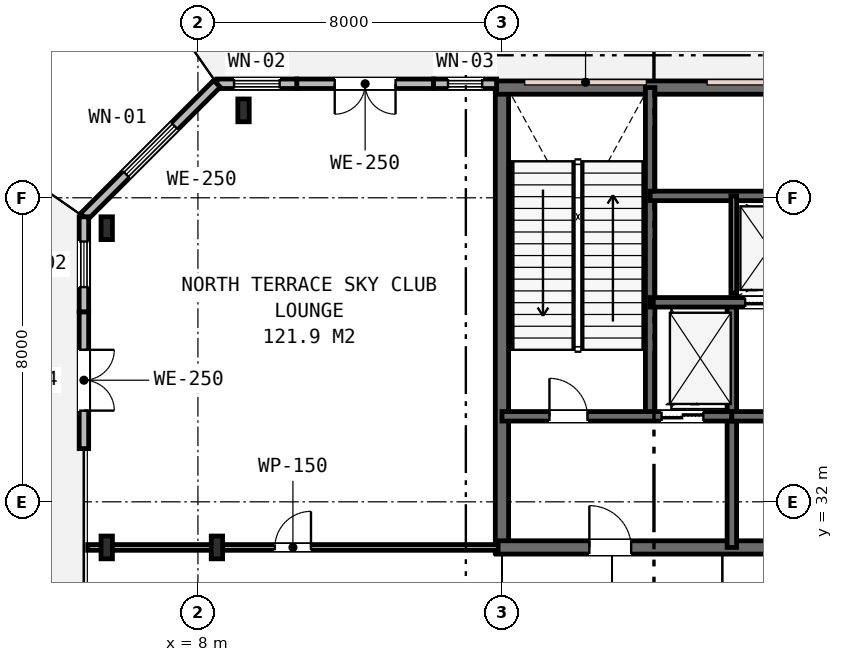
"""IFC4 building model, lengths in metres.
Left out: names, types, materials, properties, quantities, classifications, styles, units other than length and angle.
Written with IfcOpenShell. Run it as: python <this file> out.ifc"""

import sys

from ifc_helpers import new_model, si_unit, direction, frame, frame_2d, origin, origin_2d, place, context, subcontext, project, spatial, rectangle, i_section, extrude, element, fill, save


model = new_model("IFC4")
c1 = context("Model", 3, precision=1e-05, world=origin(), true_north=direction((0.0, 1.0)))
c2 = subcontext(c1, "Body", "Model", "MODEL_VIEW")
j1 = project(units=[si_unit("LENGTHUNIT", "METRE"), si_unit("PLANEANGLEUNIT", "RADIAN")], contexts=[c1])
p1 = place(None, origin())
s1 = spatial("IfcSite", under=j1, at=p1, CompositionType="ELEMENT")
p2 = place(p1, origin())
s2 = spatial("IfcBuilding", under=s1, at=p2, CompositionType="ELEMENT")
p3 = place(p2, frame((0.0, 0.0, 148.8)))
s3 = spatial("IfcBuildingStorey", under=s2, at=p3, CompositionType="ELEMENT", Elevation=148.8)
p4 = place(p3, frame((16.0, 30.65, 0.0), z_axis=(0.0, 0.0, 1.0), x_axis=(0.0, 1.0, 0.0)))
e1 = element("IfcWall", 1, at=p4, inside=s3, PredefinedType="SHEAR", context=c2, shape_type="SweptSolid", body=[
    extrude(rectangle(XDim=12.3, YDim=0.35, at=frame_2d((6.15, 0.0))), origin(), (0.0, 0.0, 1.0), 5.4),
])
p5 = place(p3, frame((15.85, 42.9, 0.0), z_axis=(0.0, 0.0, 1.0), x_axis=(1.0, 0.0, 0.0)))
e2 = element("IfcWall", 2, at=p5, inside=s3, PredefinedType="SHEAR", context=c2, shape_type="SweptSolid", body=[
    extrude(rectangle(XDim=24.3, YDim=0.35, at=frame_2d((12.15, 0.0))), origin(), (0.0, 0.0, 1.0), 5.4),
])
p6 = place(p3, frame((15.85, 30.8, 0.0), z_axis=(0.0, 0.0, 1.0), x_axis=(1.0, 0.0, 0.0)))
e3 = element("IfcWall", 3, at=p6, inside=s3, PredefinedType="SHEAR", context=c2, shape_type="SweptSolid", body=[
    extrude(rectangle(XDim=11.2, YDim=0.35, at=frame_2d((5.6, 0.0))), origin(), (0.0, 0.0, 1.0), 5.4),
])
p7 = place(p6, frame((2.45, 0.0, 0.0)))
e4 = element("IfcOpeningElement", 4, at=p7, cuts=e3, PredefinedType="OPENING", context=c2, shape_type="SweptSolid", body=[
    extrude(rectangle(XDim=1.1, YDim=2.15, at=frame_2d((0.55, 1.075))), frame((0.0, 0.185, 0.0), z_axis=(0.0, -1.0, 0.0), x_axis=(1.0, 0.0, 0.0)), (0.0, 0.0, 1.0), 0.37),
])
p8 = place(p3, frame((19.9, 34.25, 0.0), z_axis=(0.0, 0.0, 1.0), x_axis=(0.0, 1.0, 0.0)))
e5 = element("IfcWall", 5, at=p8, inside=s3, PredefinedType="SHEAR", context=c2, shape_type="SweptSolid", body=[
    extrude(rectangle(XDim=8.65, YDim=0.25, at=frame_2d((4.325, 0.0))), origin(), (0.0, 0.0, 1.0), 5.4),
])
p9 = place(p3, frame((22.05, 30.8, 0.0), z_axis=(0.0, 0.0, 1.0), x_axis=(0.0, 1.0, 0.0)))
e6 = element("IfcWall", 6, at=p9, inside=s3, PredefinedType="SHEAR", context=c2, shape_type="SweptSolid", body=[
    extrude(rectangle(XDim=6.45, YDim=0.25, at=frame_2d((3.225, 0.0))), origin(), (0.0, 0.0, 1.0), 5.4),
])
p10 = place(p3, frame((16.0, 34.25, 0.0), z_axis=(0.0, 0.0, 1.0), x_axis=(1.0, 0.0, 0.0)))
e7 = element("IfcWall", 7, at=p10, inside=s3, PredefinedType="SHEAR", context=c2, shape_type="SweptSolid", body=[
    extrude(rectangle(XDim=6.05, YDim=0.25, at=frame_2d((3.025, 0.0))), origin(), (0.0, 0.0, 1.0), 5.4),
])
p11 = place(p10, frame((1.25, 0.0, 0.0)))
e8 = element("IfcOpeningElement", 8, at=p11, cuts=e7, PredefinedType="OPENING", context=c2, shape_type="SweptSolid", body=[
    extrude(rectangle(XDim=1.0, YDim=2.15, at=frame_2d((0.5, 1.075))), frame((0.0, 0.135, 0.0), z_axis=(0.0, -1.0, 0.0), x_axis=(1.0, 0.0, 0.0)), (0.0, 0.0, 1.0), 0.27),
])
p12 = place(p10, frame((4.2, 0.0, 0.0)))
e9 = element("IfcOpeningElement", 9, at=p12, cuts=e7, PredefinedType="OPENING", context=c2, shape_type="SweptSolid", body=[
    extrude(rectangle(XDim=1.1, YDim=2.15, at=frame_2d((0.55, 1.075))), frame((0.0, 0.135, 0.0), z_axis=(0.0, -1.0, 0.0), x_axis=(1.0, 0.0, 0.0)), (0.0, 0.0, 1.0), 0.27),
])
p13 = place(p3, frame((22.05, 34.25, 0.0), z_axis=(0.0, 0.0, 1.0), x_axis=(1.0, 0.0, 0.0)))
e10 = element("IfcWall", 10, at=p13, inside=s3, PredefinedType="SHEAR", context=c2, shape_type="SweptSolid", body=[
    extrude(rectangle(XDim=5.0, YDim=0.25, at=frame_2d((2.5, 0.0))), origin(), (0.0, 0.0, 1.0), 5.4),
])
p14 = place(p13, frame((1.95, 0.0, 0.0)))
e11 = element("IfcOpeningElement", 11, at=p14, cuts=e10, PredefinedType="OPENING", context=c2, shape_type="SweptSolid", body=[
    extrude(rectangle(XDim=1.0, YDim=2.15, at=frame_2d((0.5, 1.075))), frame((0.0, 0.135, 0.0), z_axis=(0.0, -1.0, 0.0), x_axis=(1.0, 0.0, 0.0)), (0.0, 0.0, 1.0), 0.27),
])
p15 = place(p3, frame((19.9, 37.25, 0.0), z_axis=(0.0, 0.0, 1.0), x_axis=(1.0, 0.0, 0.0)))
e12 = element("IfcWall", 12, at=p15, inside=s3, PredefinedType="SHEAR", context=c2, shape_type="SweptSolid", body=[
    extrude(rectangle(XDim=16.2, YDim=0.25, at=frame_2d((8.1, 0.0))), origin(), (0.0, 0.0, 1.0), 5.4),
])
p16 = place(p15, frame((12.55, 0.0, 0.0)))
e13 = element("IfcOpeningElement", 13, at=p16, cuts=e12, PredefinedType="OPENING", context=c2, shape_type="SweptSolid", body=[
    extrude(rectangle(XDim=0.9, YDim=2.15, at=frame_2d((0.45, 1.075))), frame((0.0, 0.135, 0.0), z_axis=(0.0, -1.0, 0.0), x_axis=(1.0, 0.0, 0.0)), (0.0, 0.0, 1.0), 0.27),
])
p17 = place(p15, frame((2.5, 0.0, 0.0)))
e14 = element("IfcOpeningElement", 14, at=p17, cuts=e12, PredefinedType="OPENING", context=c2, shape_type="SweptSolid", body=[
    extrude(rectangle(XDim=1.05, YDim=2.15, at=frame_2d((0.525, 1.075))), frame((0.0, 0.135, 0.0), z_axis=(0.0, -1.0, 0.0), x_axis=(1.0, 0.0, 0.0)), (0.0, 0.0, 1.0), 0.27),
])
p18 = place(p15, frame((4.4, 0.0, 0.0)))
e15 = element("IfcOpeningElement", 15, at=p18, cuts=e12, PredefinedType="OPENING", context=c2, shape_type="SweptSolid", body=[
    extrude(rectangle(XDim=1.05, YDim=2.15, at=frame_2d((0.525, 1.075))), frame((0.0, 0.135, 0.0), z_axis=(0.0, -1.0, 0.0), x_axis=(1.0, 0.0, 0.0)), (0.0, 0.0, 1.0), 0.27),
])
p19 = place(p15, frame((6.3, 0.0, 0.0)))
e16 = element("IfcOpeningElement", 16, at=p19, cuts=e12, PredefinedType="OPENING", context=c2, shape_type="SweptSolid", body=[
    extrude(rectangle(XDim=1.05, YDim=2.15, at=frame_2d((0.525, 1.075))), frame((0.0, 0.135, 0.0), z_axis=(0.0, -1.0, 0.0), x_axis=(1.0, 0.0, 0.0)), (0.0, 0.0, 1.0), 0.27),
])
p20 = place(p3, frame((19.9, 40.05, 0.0), z_axis=(0.0, 0.0, 1.0), x_axis=(1.0, 0.0, 0.0)))
e17 = element("IfcWall", 17, at=p20, inside=s3, PredefinedType="SHEAR", context=c2, shape_type="SweptSolid", body=[
    extrude(rectangle(XDim=12.05, YDim=0.25, at=frame_2d((6.025, 0.0))), origin(), (0.0, 0.0, 1.0), 5.4),
])
for number, where, z_axis, x_axis in (
    (18, (5.6, 30.8, 0.0), (0.0, 0.0, 1.0), (1.0, 0.0, 0.0)),
    (19, (5.6, 39.2, 0.0), (0.0, 0.0, 1.0), (1.0, 0.0, 0.0)),
    (20, (8.5, 30.8, 0.0), (0.0, 0.0, 1.0), (1.0, 0.0, 0.0)),
    (21, (9.2, 42.3, 0.0), (0.0, 0.0, 1.0), (1.0, 0.0, 0.0)),
):
    element("IfcColumn", number, at=place(p3, frame(where, z_axis=z_axis, x_axis=x_axis)), inside=s3, PredefinedType="COLUMN", context=c2, shape_type="SweptSolid", body=[
        extrude(i_section(OverallWidth=0.3, OverallDepth=0.6, WebThickness=0.015, FlangeThickness=0.03, FilletRadius=0.027, at=origin_2d()), origin(), (0.0, 0.0, 1.0), 5.4),
    ])
p21 = place(p3, frame((14.2, 43.0, 0.0), z_axis=(0.0, 0.0, 1.0), x_axis=(-1.0, 0.0, 0.0)))
e22 = element("IfcWall", 22, at=p21, inside=s3, PredefinedType="STANDARD", context=c2, shape_type="SweptSolid", body=[
    extrude(rectangle(XDim=3.6, YDim=0.25, at=frame_2d((1.8, 0.0))), origin(), (0.0, 0.0, 1.0), 5.13),
])
p22 = place(p21, frame((1.0, 0.0, 0.0)))
e23 = element("IfcOpeningElement", 23, at=p22, cuts=e22, PredefinedType="OPENING", context=c2, shape_type="SweptSolid", body=[
    extrude(rectangle(XDim=1.6, YDim=2.2, at=frame_2d((0.8, 1.1))), frame((0.0, 0.135, 0.0), z_axis=(0.0, -1.0, 0.0), x_axis=(1.0, 0.0, 0.0)), (0.0, 0.0, 1.0), 0.27),
])
p23 = place(p3, frame((15.86, 43.0, 0.0), z_axis=(0.0, 0.0, 1.0), x_axis=(-1.0, 0.0, 0.0)))
e24 = element("IfcWall", 24, at=p23, inside=s3, PredefinedType="STANDARD", context=c2, shape_type="SweptSolid", body=[
    extrude(rectangle(XDim=1.66, YDim=0.25, at=frame_2d((0.83, 0.0))), origin(), (0.0, 0.0, 1.0), 5.13),
])
p24 = place(p23, frame((0.38, 0.0, 0.9)))
e25 = element("IfcOpeningElement", 25, at=p24, cuts=e24, PredefinedType="OPENING", context=c2, shape_type="SweptSolid", body=[
    extrude(rectangle(XDim=0.9, YDim=1.55, at=frame_2d((0.45, 0.775))), frame((0.0, 0.135, 0.0), z_axis=(0.0, -1.0, 0.0), x_axis=(1.0, 0.0, 0.0)), (0.0, 0.0, 1.0), 0.27),
])
p25 = place(p3, frame((10.6, 43.0, 0.0), z_axis=(0.0, 0.0, 1.0), x_axis=(-1.0, 0.0, 0.0)))
e26 = element("IfcWall", 26, at=p25, inside=s3, PredefinedType="STANDARD", context=c2, shape_type="SweptSolid", body=[
    extrude(rectangle(XDim=2.1, YDim=0.25, at=frame_2d((1.05, 0.0))), origin(), (0.0, 0.0, 1.0), 5.13),
])
p26 = place(p25, frame((0.45, 0.0, 0.85)))
e27 = element("IfcOpeningElement", 27, at=p26, cuts=e26, PredefinedType="OPENING", context=c2, shape_type="SweptSolid", body=[
    extrude(rectangle(XDim=1.2, YDim=1.6, at=frame_2d((0.6, 0.8))), frame((0.0, 0.135, 0.0), z_axis=(0.0, -1.0, 0.0), x_axis=(1.0, 0.0, 0.0)), (0.0, 0.0, 1.0), 0.27),
])
p27 = place(p3, frame((8.5, 43.0, 0.0), z_axis=(0.0, 0.0, 1.0), x_axis=(-0.707106781187, -0.707106781187, 0.0)))
e28 = element("IfcWall", 28, at=p27, inside=s3, PredefinedType="STANDARD", context=c2, shape_type="SweptSolid", body=[
    extrude(rectangle(XDim=4.95, YDim=0.25, at=frame_2d((2.475, 0.0))), origin(), (0.0, 0.0, 1.0), 5.13),
])
p28 = place(p27, frame((1.575, 0.0, 0.75)))
e29 = element("IfcOpeningElement", 29, at=p28, cuts=e28, PredefinedType="OPENING", context=c2, shape_type="SweptSolid", body=[
    extrude(rectangle(XDim=1.8, YDim=1.85, at=frame_2d((0.9, 0.925))), frame((0.0, 0.135, 0.0), z_axis=(0.0, -1.0, 0.0), x_axis=(1.0, 0.0, 0.0)), (0.0, 0.0, 1.0), 0.27),
])
p29 = place(p3, frame((5.0, 37.0, 0.0), z_axis=(0.0, 0.0, 1.0), x_axis=(0.0, -1.0, 0.0)))
e30 = element("IfcWall", 30, at=p29, inside=s3, PredefinedType="STANDARD", context=c2, shape_type="SweptSolid", body=[
    extrude(rectangle(XDim=3.6, YDim=0.25, at=frame_2d((1.8, 0.0))), origin(), (0.0, 0.0, 1.0), 5.13),
])
p30 = place(p29, frame((1.0, 0.0, 0.0)))
e31 = element("IfcOpeningElement", 31, at=p30, cuts=e30, PredefinedType="OPENING", context=c2, shape_type="SweptSolid", body=[
    extrude(rectangle(XDim=1.6, YDim=2.2, at=frame_2d((0.8, 1.1))), frame((0.0, 0.135, 0.0), z_axis=(0.0, -1.0, 0.0), x_axis=(1.0, 0.0, 0.0)), (0.0, 0.0, 1.0), 0.27),
])
p31 = place(p3, frame((5.0, 39.5, 0.0), z_axis=(0.0, 0.0, 1.0), x_axis=(0.0, -1.0, 0.0)))
e32 = element("IfcWall", 32, at=p31, inside=s3, PredefinedType="STANDARD", context=c2, shape_type="SweptSolid", body=[
    extrude(rectangle(XDim=2.5, YDim=0.25, at=frame_2d((1.25, 0.0))), origin(), (0.0, 0.0, 1.0), 5.13),
])
p32 = place(p31, frame((0.65, 0.0, 0.85)))
e33 = element("IfcOpeningElement", 33, at=p32, cuts=e32, PredefinedType="OPENING", context=c2, shape_type="SweptSolid", body=[
    extrude(rectangle(XDim=1.2, YDim=1.6, at=frame_2d((0.6, 0.8))), frame((0.0, 0.135, 0.0), z_axis=(0.0, -1.0, 0.0), x_axis=(1.0, 0.0, 0.0)), (0.0, 0.0, 1.0), 0.27),
])
p33 = place(p3, frame((22.1, 37.49, 0.0), z_axis=(0.0, 0.0, 1.0), x_axis=(0.0, 1.0, 0.0)))
e34 = element("IfcWall", 34, at=p33, inside=s3, PredefinedType="PLUMBINGWALL", context=c2, shape_type="SweptSolid", body=[
    extrude(rectangle(XDim=2.56, YDim=0.15, at=frame_2d((1.28, 0.0))), origin(), (0.0, 0.0, 1.0), 5.13),
])
p34 = place(p3, frame((5.1, 30.8, 0.0), z_axis=(0.0, 0.0, 1.0), x_axis=(1.0, 0.0, 0.0)))
e35 = element("IfcWall", 35, at=p34, inside=s3, PredefinedType="PARTITIONING", context=c2, shape_type="SweptSolid", body=[
    extrude(rectangle(XDim=10.8, YDim=0.15, at=frame_2d((5.4, 0.0))), origin(), (0.0, 0.0, 1.0), 4.73),
])
p35 = place(p34, frame((4.925, 0.0, 0.0)))
e36 = element("IfcOpeningElement", 36, at=p35, cuts=e35, PredefinedType="OPENING", context=c2, shape_type="SweptSolid", body=[
    extrude(rectangle(XDim=0.95, YDim=2.15, at=frame_2d((0.475, 1.075))), frame((0.0, 0.085, 0.0), z_axis=(0.0, -1.0, 0.0), x_axis=(1.0, 0.0, 0.0)), (0.0, 0.0, 1.0), 0.17),
])
p36 = place(p22, origin())
e37 = element("IfcDoor", 37, at=p36, inside=s3, OperationType="DOUBLE_DOOR_SINGLE_SWING", PredefinedType="DOOR", context=c2, shape_type="SweptSolid", body=[
    extrude(rectangle(XDim=1.6, YDim=2.2, at=frame_2d((0.8, 1.1))), frame((0.0, 0.025, 0.0), z_axis=(0.0, -1.0, 0.0), x_axis=(1.0, 0.0, 0.0)), (0.0, 0.0, 1.0), 0.05),
])
fill(e23, e37)
p37 = place(p24, origin())
e38 = element("IfcWindow", 38, at=p37, inside=s3, PartitioningType="SINGLE_PANEL", PredefinedType="WINDOW", context=c2, shape_type="SweptSolid", body=[
    extrude(rectangle(XDim=0.9, YDim=1.55, at=frame_2d((0.45, 0.775))), frame((0.0, 0.03, 0.0), z_axis=(0.0, -1.0, 0.0), x_axis=(1.0, 0.0, 0.0)), (0.0, 0.0, 1.0), 0.06),
])
fill(e25, e38)
p38 = place(p26, origin())
e39 = element("IfcWindow", 39, at=p38, inside=s3, PartitioningType="SINGLE_PANEL", PredefinedType="WINDOW", context=c2, shape_type="SweptSolid", body=[
    extrude(rectangle(XDim=1.2, YDim=1.6, at=frame_2d((0.6, 0.8))), frame((0.0, 0.03, 0.0), z_axis=(0.0, -1.0, 0.0), x_axis=(1.0, 0.0, 0.0)), (0.0, 0.0, 1.0), 0.06),
])
fill(e27, e39)
p39 = place(p28, origin())
e40 = element("IfcWindow", 40, at=p39, inside=s3, PartitioningType="SINGLE_PANEL", PredefinedType="WINDOW", context=c2, shape_type="SweptSolid", body=[
    extrude(rectangle(XDim=1.8, YDim=1.85, at=frame_2d((0.9, 0.925))), frame((0.0, 0.03, 0.0), z_axis=(0.0, -1.0, 0.0), x_axis=(1.0, 0.0, 0.0)), (0.0, 0.0, 1.0), 0.06),
])
fill(e29, e40)
p40 = place(p30, origin())
e41 = element("IfcDoor", 41, at=p40, inside=s3, OperationType="DOUBLE_DOOR_SINGLE_SWING", PredefinedType="DOOR", context=c2, shape_type="SweptSolid", body=[
    extrude(rectangle(XDim=1.6, YDim=2.2, at=frame_2d((0.8, 1.1))), frame((0.0, 0.025, 0.0), z_axis=(0.0, -1.0, 0.0), x_axis=(1.0, 0.0, 0.0)), (0.0, 0.0, 1.0), 0.05),
])
fill(e31, e41)
p41 = place(p32, origin())
e42 = element("IfcWindow", 42, at=p41, inside=s3, PartitioningType="SINGLE_PANEL", PredefinedType="WINDOW", context=c2, shape_type="SweptSolid", body=[
    extrude(rectangle(XDim=1.2, YDim=1.6, at=frame_2d((0.6, 0.8))), frame((0.0, 0.03, 0.0), z_axis=(0.0, -1.0, 0.0), x_axis=(1.0, 0.0, 0.0)), (0.0, 0.0, 1.0), 0.06),
])
fill(e33, e42)
p42 = place(p11, origin())
e43 = element("IfcDoor", 43, at=p42, inside=s3, OperationType="SINGLE_SWING_LEFT", PredefinedType="DOOR", context=c2, shape_type="SweptSolid", body=[
    extrude(rectangle(XDim=1.0, YDim=2.15, at=frame_2d((0.5, 1.075))), frame((0.0, 0.025, 0.0), z_axis=(0.0, -1.0, 0.0), x_axis=(1.0, 0.0, 0.0)), (0.0, 0.0, 1.0), 0.05),
])
fill(e8, e43)
p43 = place(p7, origin())
e44 = element("IfcDoor", 44, at=p43, inside=s3, OperationType="SINGLE_SWING_LEFT", PredefinedType="DOOR", context=c2, shape_type="SweptSolid", body=[
    extrude(rectangle(XDim=1.1, YDim=2.15, at=frame_2d((0.55, 1.075))), frame((0.0, 0.025, 0.0), z_axis=(0.0, -1.0, 0.0), x_axis=(1.0, 0.0, 0.0)), (0.0, 0.0, 1.0), 0.05),
])
fill(e4, e44)
p44 = place(p35, origin())
e45 = element("IfcDoor", 45, at=p44, inside=s3, OperationType="SINGLE_SWING_RIGHT", PredefinedType="DOOR", context=c2, shape_type="SweptSolid", body=[
    extrude(rectangle(XDim=0.95, YDim=2.15, at=frame_2d((0.475, 1.075))), frame((0.0, 0.025, 0.0), z_axis=(0.0, -1.0, 0.0), x_axis=(1.0, 0.0, 0.0)), (0.0, 0.0, 1.0), 0.05),
])
fill(e36, e45)
p45 = place(p12, origin())
e46 = element("IfcDoor", 46, at=p45, inside=s3, OperationType="DOUBLE_DOOR_SLIDING", PredefinedType="DOOR", context=c2, shape_type="SweptSolid", body=[
    extrude(rectangle(XDim=1.1, YDim=2.15, at=frame_2d((0.55, 1.075))), frame((0.0, 0.025, 0.0), z_axis=(0.0, -1.0, 0.0), x_axis=(1.0, 0.0, 0.0)), (0.0, 0.0, 1.0), 0.05),
])
fill(e9, e46)
p46 = place(p17, origin())
e47 = element("IfcDoor", 47, at=p46, inside=s3, OperationType="DOUBLE_DOOR_SLIDING", PredefinedType="DOOR", context=c2, shape_type="SweptSolid", body=[
    extrude(rectangle(XDim=1.05, YDim=2.15, at=frame_2d((0.525, 1.075))), frame((0.0, 0.025, 0.0), z_axis=(0.0, -1.0, 0.0), x_axis=(1.0, 0.0, 0.0)), (0.0, 0.0, 1.0), 0.05),
])
fill(e14, e47)
save(model, sys.argv[1])
